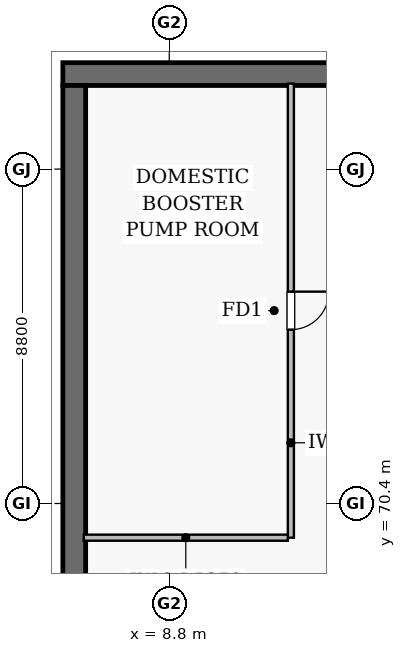
"""IFC4 building model, lengths in metres.
Left out: names, types, materials, properties, quantities, classifications, styles, units other than length and angle.
Written with IfcOpenShell. Run it as: python <this file> out.ifc"""

import sys

from ifc_helpers import new_model, si_unit, direction, frame, frame_2d, origin, place, context, subcontext, project, spatial, rectangle, extrude, element, fill, save


model = new_model("IFC4")
c1 = context("Model", 3, precision=1e-05, world=origin(), true_north=direction((0.0, 1.0)))
c2 = subcontext(c1, "Body", "Model", "MODEL_VIEW")
j1 = project(units=[si_unit("LENGTHUNIT", "METRE"), si_unit("PLANEANGLEUNIT", "RADIAN")], contexts=[c1])
p1 = place(None, origin())
s1 = spatial("IfcSite", under=j1, at=p1, CompositionType="ELEMENT")
p2 = place(p1, origin())
s2 = spatial("IfcBuilding", under=s1, at=p2, CompositionType="ELEMENT")
p3 = place(p2, frame((0.0, 0.0, -11.7)))
s3 = spatial("IfcBuildingStorey", under=s2, at=p3, CompositionType="ELEMENT", Elevation=-11.7)
p4 = place(p3, frame((82.0, 81.7, 0.0), z_axis=(0.0, 0.0, 1.0), x_axis=(-1.0, 0.0, 0.0)))
e1 = element("IfcWall", 1, at=p4, inside=s3, PredefinedType="SOLIDWALL", context=c2, shape_type="SweptSolid", body=[
    extrude(rectangle(XDim=76.0, YDim=0.6, at=frame_2d((38.0, 0.0))), origin(), (0.0, 0.0, 1.0), 3.58),
])
p5 = place(p3, frame((6.3, 81.4, 0.0), z_axis=(0.0, 0.0, 1.0), x_axis=(0.0, -1.0, 0.0)))
e2 = element("IfcWall", 2, at=p5, inside=s3, PredefinedType="SOLIDWALL", context=c2, shape_type="SweptSolid", body=[
    extrude(rectangle(XDim=74.8, YDim=0.6, at=frame_2d((37.4, 0.0))), origin(), (0.0, 0.0, 1.0), 3.58),
])
p6 = place(p3, frame((12.0, 81.45, 0.0), z_axis=(0.0, 0.0, 1.0), x_axis=(0.0, -1.0, 0.0)))
e3 = element("IfcWall", 3, at=p6, inside=s3, PredefinedType="SOLIDWALL", context=c2, shape_type="SweptSolid", body=[
    extrude(rectangle(XDim=11.95, YDim=0.16, at=frame_2d((5.975, 0.0))), origin(), (0.0, 0.0, 1.0), 3.58),
])
p7 = place(p6, frame((5.475, 0.0, 0.0)))
e4 = element("IfcOpeningElement", 4, at=p7, cuts=e3, PredefinedType="OPENING", context=c2, shape_type="SweptSolid", body=[
    extrude(rectangle(XDim=1.0, YDim=2.15, at=frame_2d((0.5, 1.075))), frame((0.0, 0.09, 0.0), z_axis=(0.0, -1.0, 0.0), x_axis=(1.0, 0.0, 0.0)), (0.0, 0.0, 1.0), 0.18),
])
p8 = place(p3, frame((11.92, 69.5, 0.0), z_axis=(0.0, 0.0, 1.0), x_axis=(-1.0, 0.0, 0.0)))
e5 = element("IfcWall", 5, at=p8, inside=s3, PredefinedType="SOLIDWALL", context=c2, shape_type="SweptSolid", body=[
    extrude(rectangle(XDim=5.37, YDim=0.16, at=frame_2d((2.685, 0.0))), origin(), (0.0, 0.0, 1.0), 3.58),
])
p9 = place(p7, origin())
e6 = element("IfcDoor", 6, at=p9, inside=s3, OperationType="SINGLE_SWING_LEFT", PredefinedType="DOOR", context=c2, shape_type="SweptSolid", body=[
    extrude(rectangle(XDim=1.0, YDim=2.15, at=frame_2d((0.5, 1.075))), frame((0.0, 0.025, 0.0), z_axis=(0.0, -1.0, 0.0), x_axis=(1.0, 0.0, 0.0)), (0.0, 0.0, 1.0), 0.05),
])
fill(e4, e6)
save(model, sys.argv[1])
